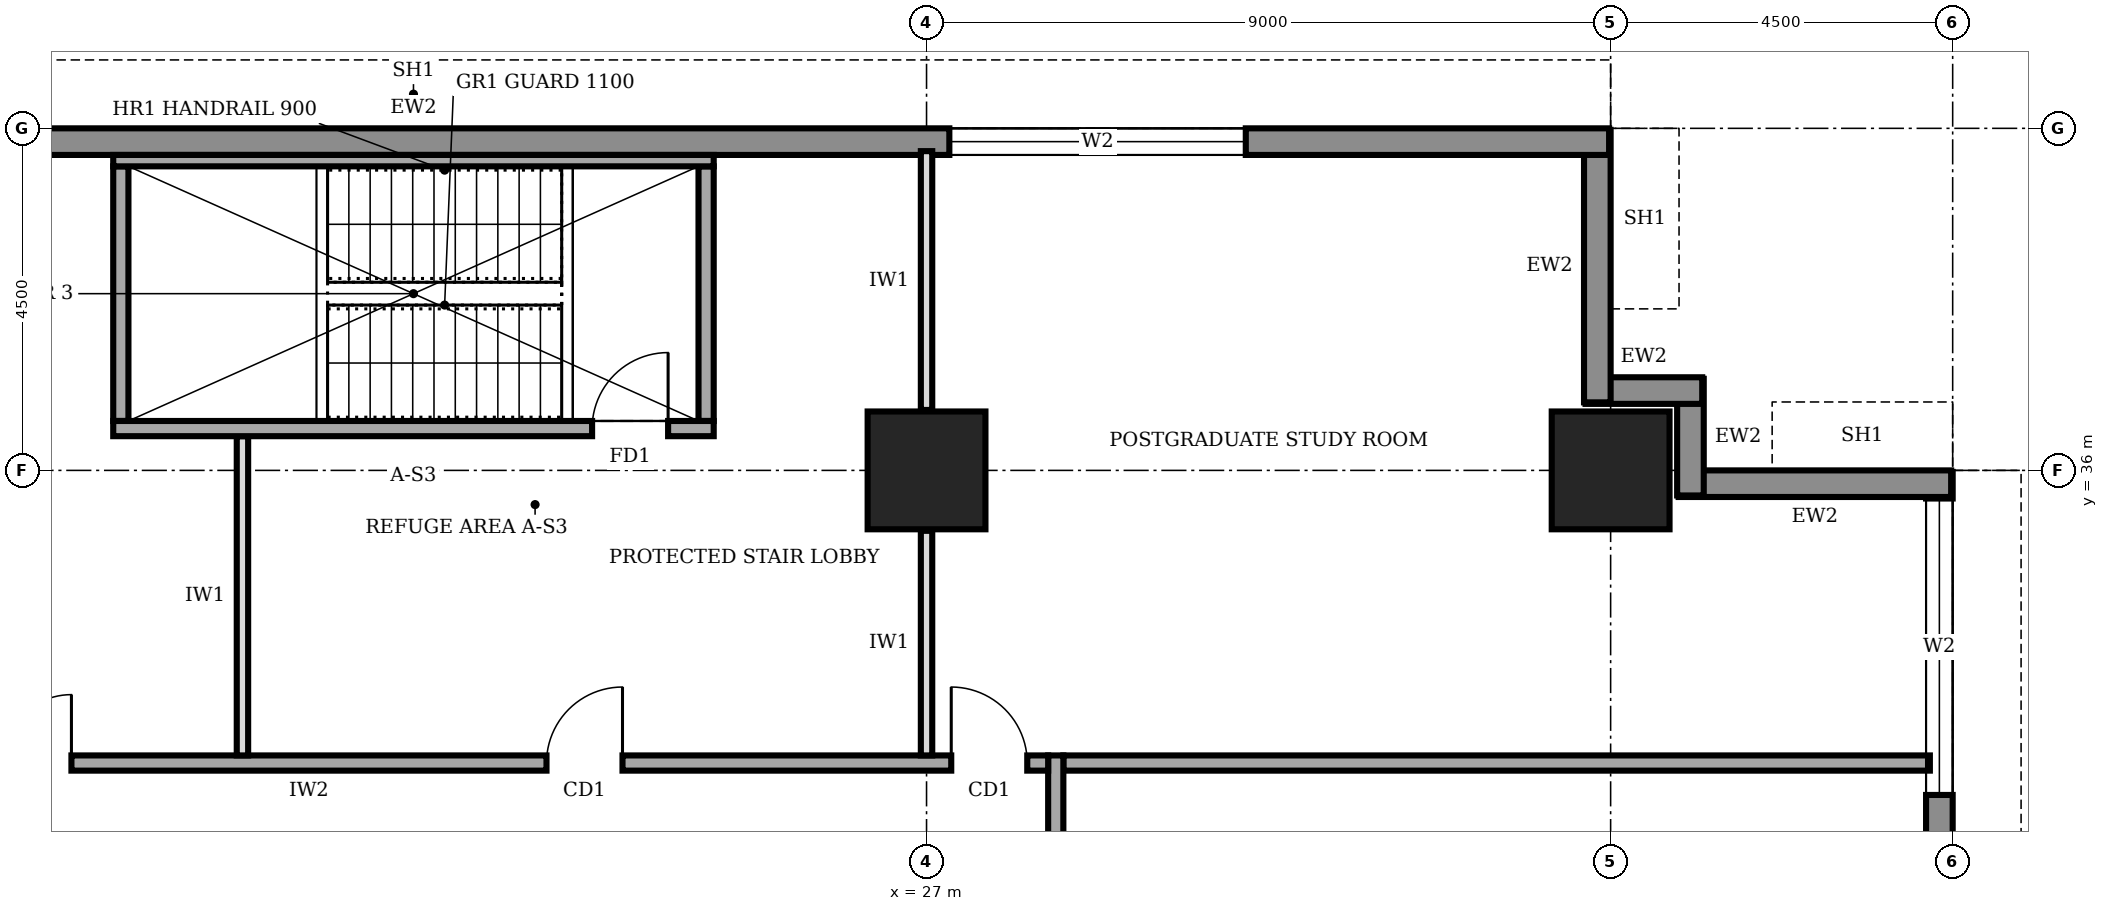
"""IFC4 building model, lengths in metres.
Left out: names, types, materials, properties, quantities, classifications, styles, units other than length and angle.
Written with IfcOpenShell. Run it as: python <this file> out.ifc"""

import sys

from ifc_helpers import new_model, si_unit, direction, frame, frame_2d, origin, origin_2d, place, context, subcontext, project, spatial, rectangle, extrude, element, fill, save


model = new_model("IFC4")
c1 = context("Model", 3, precision=1e-05, world=origin(), true_north=direction((0.0, 1.0)))
c2 = subcontext(c1, "Body", "Model", "MODEL_VIEW")
j1 = project(units=[si_unit("LENGTHUNIT", "METRE"), si_unit("PLANEANGLEUNIT", "RADIAN")], contexts=[c1])
p1 = place(None, origin())
s1 = spatial("IfcSite", under=j1, at=p1, CompositionType="ELEMENT")
p2 = place(p1, origin())
s2 = spatial("IfcBuilding", under=s1, at=p2, CompositionType="ELEMENT")
p3 = place(p2, frame((0.0, 0.0, 229.0)))
s3 = spatial("IfcBuildingStorey", under=s2, at=p3, CompositionType="ELEMENT", Elevation=229.0)
for number, where, z_axis, x_axis in (
    (1, (27.0, 36.0, 0.0), (0.0, 0.0, 1.0), (1.0, 0.0, 0.0)),
    (2, (36.0, 36.0, 0.0), (0.0, 0.0, 1.0), (1.0, 0.0, 0.0)),
):
    element("IfcColumn", number, at=place(p3, frame(where, z_axis=z_axis, x_axis=x_axis)), inside=s3, PredefinedType="COLUMN", context=c2, shape_type="SweptSolid", body=[
        extrude(rectangle(XDim=1.55, YDim=1.55, at=origin_2d()), origin(), (0.0, 0.0, 1.0), 4.0),
    ])
p4 = place(p3, frame((40.325, 4.52, 0.0), z_axis=(0.0, 0.0, 1.0), x_axis=(0.0, 1.0, 0.0)))
e3 = element("IfcWall", 3, at=p4, inside=s3, PredefinedType="STANDARD", context=c2, shape_type="SweptSolid", body=[
    extrude(rectangle(XDim=31.46, YDim=0.35, at=frame_2d((15.73, 0.0))), origin(), (0.0, 0.0, 1.0), 3.75),
])
p5 = place(p4, frame((4.78, 0.0, 0.6)))
e4 = element("IfcOpeningElement", 4, at=p5, cuts=e3, PredefinedType="OPENING", context=c2, shape_type="SweptSolid", body=[
    extrude(rectangle(XDim=3.9, YDim=2.6, at=frame_2d((1.95, 1.3))), frame((0.0, 0.185, 0.0), z_axis=(0.0, -1.0, 0.0), x_axis=(1.0, 0.0, 0.0)), (0.0, 0.0, 1.0), 0.37),
])
p6 = place(p4, frame((9.28, 0.0, 0.6)))
e5 = element("IfcOpeningElement", 5, at=p6, cuts=e3, PredefinedType="OPENING", context=c2, shape_type="SweptSolid", body=[
    extrude(rectangle(XDim=3.9, YDim=2.6, at=frame_2d((1.95, 1.3))), frame((0.0, 0.185, 0.0), z_axis=(0.0, -1.0, 0.0), x_axis=(1.0, 0.0, 0.0)), (0.0, 0.0, 1.0), 0.37),
])
p7 = place(p4, frame((13.78, 0.0, 0.6)))
e6 = element("IfcOpeningElement", 6, at=p7, cuts=e3, PredefinedType="OPENING", context=c2, shape_type="SweptSolid", body=[
    extrude(rectangle(XDim=3.9, YDim=2.6, at=frame_2d((1.95, 1.3))), frame((0.0, 0.185, 0.0), z_axis=(0.0, -1.0, 0.0), x_axis=(1.0, 0.0, 0.0)), (0.0, 0.0, 1.0), 0.37),
])
p8 = place(p4, frame((18.28, 0.0, 0.6)))
e7 = element("IfcOpeningElement", 7, at=p8, cuts=e3, PredefinedType="OPENING", context=c2, shape_type="SweptSolid", body=[
    extrude(rectangle(XDim=3.9, YDim=2.6, at=frame_2d((1.95, 1.3))), frame((0.0, 0.185, 0.0), z_axis=(0.0, -1.0, 0.0), x_axis=(1.0, 0.0, 0.0)), (0.0, 0.0, 1.0), 0.37),
])
p9 = place(p4, frame((22.78, 0.0, 0.6)))
e8 = element("IfcOpeningElement", 8, at=p9, cuts=e3, PredefinedType="OPENING", context=c2, shape_type="SweptSolid", body=[
    extrude(rectangle(XDim=3.9, YDim=2.6, at=frame_2d((1.95, 1.3))), frame((0.0, 0.185, 0.0), z_axis=(0.0, -1.0, 0.0), x_axis=(1.0, 0.0, 0.0)), (0.0, 0.0, 1.0), 0.37),
])
p10 = place(p4, frame((27.21, 0.0, 0.6)))
e9 = element("IfcOpeningElement", 9, at=p10, cuts=e3, PredefinedType="OPENING", context=c2, shape_type="SweptSolid", body=[
    extrude(rectangle(XDim=3.9, YDim=2.6, at=frame_2d((1.95, 1.3))), frame((0.0, 0.185, 0.0), z_axis=(0.0, -1.0, 0.0), x_axis=(1.0, 0.0, 0.0)), (0.0, 0.0, 1.0), 0.37),
])
p11 = place(p3, frame((40.48, 35.825, 0.0), z_axis=(0.0, 0.0, 1.0), x_axis=(-1.0, 0.0, 0.0)))
e10 = element("IfcWall", 10, at=p11, inside=s3, PredefinedType="STANDARD", context=c2, shape_type="SweptSolid", body=[
    extrude(rectangle(XDim=3.585, YDim=0.35, at=frame_2d((1.792, 0.0))), origin(), (0.0, 0.0, 1.0), 2.85),
])
for number, where, z_axis, x_axis in (
    (11, (37.05, 35.67, 0.0), (0.0, 0.0, 1.0), (0.0, 1.0, 0.0)),
    (12, (37.205, 37.05, 0.0), (0.0, 0.0, 1.0), (-1.0, 0.0, 0.0)),
):
    element("IfcWall", number, at=place(p3, frame(where, z_axis=z_axis, x_axis=x_axis)), inside=s3, PredefinedType="STANDARD", context=c2, shape_type="SweptSolid", body=[
        extrude(rectangle(XDim=1.535, YDim=0.35, at=frame_2d((0.768, 0.0))), origin(), (0.0, 0.0, 1.0), 3.75),
    ])
p12 = place(p3, frame((35.825, 36.895, 0.0), z_axis=(0.0, 0.0, 1.0), x_axis=(0.0, 1.0, 0.0)))
e13 = element("IfcWall", 13, at=p12, inside=s3, PredefinedType="STANDARD", context=c2, shape_type="SweptSolid", body=[
    extrude(rectangle(XDim=3.585, YDim=0.35, at=frame_2d((1.792, 0.0))), origin(), (0.0, 0.0, 1.0), 2.85),
])
p13 = place(p3, frame((35.98, 40.325, 0.0), z_axis=(0.0, 0.0, 1.0), x_axis=(-1.0, 0.0, 0.0)))
e14 = element("IfcWall", 14, at=p13, inside=s3, PredefinedType="STANDARD", context=c2, shape_type="SweptSolid", body=[
    extrude(rectangle(XDim=31.46, YDim=0.35, at=frame_2d((15.73, 0.0))), origin(), (0.0, 0.0, 1.0), 3.75),
])
p14 = place(p13, frame((27.21, 0.0, 0.6)))
e15 = element("IfcOpeningElement", 15, at=p14, cuts=e14, PredefinedType="OPENING", context=c2, shape_type="SweptSolid", body=[
    extrude(rectangle(XDim=3.9, YDim=2.6, at=frame_2d((1.95, 1.3))), frame((0.0, 0.185, 0.0), z_axis=(0.0, -1.0, 0.0), x_axis=(1.0, 0.0, 0.0)), (0.0, 0.0, 1.0), 0.37),
])
p15 = place(p13, frame((22.78, 0.0, 0.6)))
e16 = element("IfcOpeningElement", 16, at=p15, cuts=e14, PredefinedType="OPENING", context=c2, shape_type="SweptSolid", body=[
    extrude(rectangle(XDim=3.9, YDim=2.6, at=frame_2d((1.95, 1.3))), frame((0.0, 0.185, 0.0), z_axis=(0.0, -1.0, 0.0), x_axis=(1.0, 0.0, 0.0)), (0.0, 0.0, 1.0), 0.37),
])
p16 = place(p13, frame((4.78, 0.0, 0.6)))
e17 = element("IfcOpeningElement", 17, at=p16, cuts=e14, PredefinedType="OPENING", context=c2, shape_type="SweptSolid", body=[
    extrude(rectangle(XDim=3.9, YDim=2.6, at=frame_2d((1.95, 1.3))), frame((0.0, 0.185, 0.0), z_axis=(0.0, -1.0, 0.0), x_axis=(1.0, 0.0, 0.0)), (0.0, 0.0, 1.0), 0.37),
])
p17 = place(p3, frame((28.7, 9.2, 0.0), z_axis=(0.0, 0.0, 1.0), x_axis=(0.0, 1.0, 0.0)))
e18 = element("IfcWall", 18, at=p17, inside=s3, PredefinedType="SOLIDWALL", context=c2, shape_type="SweptSolid", body=[
    extrude(rectangle(XDim=23.05, YDim=0.2, at=frame_2d((11.525, 0.0))), origin(), (0.0, 0.0, 1.0), 3.75),
])
p18 = place(p17, frame((3.4, 0.0, 0.0)))
e19 = element("IfcOpeningElement", 19, at=p18, cuts=e18, PredefinedType="OPENING", context=c2, shape_type="SweptSolid", body=[
    extrude(rectangle(XDim=1.8, YDim=2.1, at=frame_2d((0.9, 1.05))), frame((0.0, 0.11, 0.0), z_axis=(0.0, -1.0, 0.0), x_axis=(1.0, 0.0, 0.0)), (0.0, 0.0, 1.0), 0.22),
])
p19 = place(p17, frame((12.4, 0.0, 0.0)))
e20 = element("IfcOpeningElement", 20, at=p19, cuts=e18, PredefinedType="OPENING", context=c2, shape_type="SweptSolid", body=[
    extrude(rectangle(XDim=1.8, YDim=2.1, at=frame_2d((0.9, 1.05))), frame((0.0, 0.11, 0.0), z_axis=(0.0, -1.0, 0.0), x_axis=(1.0, 0.0, 0.0)), (0.0, 0.0, 1.0), 0.22),
])
p20 = place(p17, frame((19.925, 0.0, 0.0)))
e21 = element("IfcOpeningElement", 21, at=p20, cuts=e18, PredefinedType="OPENING", context=c2, shape_type="SweptSolid", body=[
    extrude(rectangle(XDim=1.0, YDim=2.1, at=frame_2d((0.5, 1.05))), frame((0.0, 0.11, 0.0), z_axis=(0.0, -1.0, 0.0), x_axis=(1.0, 0.0, 0.0)), (0.0, 0.0, 1.0), 0.22),
])
p21 = place(p3, frame((28.6, 32.15, 0.0), z_axis=(0.0, 0.0, 1.0), x_axis=(-1.0, 0.0, 0.0)))
e22 = element("IfcWall", 22, at=p21, inside=s3, PredefinedType="SOLIDWALL", context=c2, shape_type="SweptSolid", body=[
    extrude(rectangle(XDim=16.9, YDim=0.2, at=frame_2d((8.45, 0.0))), origin(), (0.0, 0.0, 1.0), 3.75),
])
p22 = place(p21, frame((12.85, 0.0, 0.0)))
e23 = element("IfcOpeningElement", 23, at=p22, cuts=e22, PredefinedType="OPENING", context=c2, shape_type="SweptSolid", body=[
    extrude(rectangle(XDim=1.8, YDim=2.1, at=frame_2d((0.9, 1.05))), frame((0.0, 0.11, 0.0), z_axis=(0.0, -1.0, 0.0), x_axis=(1.0, 0.0, 0.0)), (0.0, 0.0, 1.0), 0.22),
])
p23 = place(p21, frame((5.6, 0.0, 0.0)))
e24 = element("IfcOpeningElement", 24, at=p23, cuts=e22, PredefinedType="OPENING", context=c2, shape_type="SweptSolid", body=[
    extrude(rectangle(XDim=1.0, YDim=2.1, at=frame_2d((0.5, 1.05))), frame((0.0, 0.11, 0.0), z_axis=(0.0, -1.0, 0.0), x_axis=(1.0, 0.0, 0.0)), (0.0, 0.0, 1.0), 0.22),
])
p24 = place(p21, frame((0.275, 0.0, 0.0)))
e25 = element("IfcOpeningElement", 25, at=p24, cuts=e22, PredefinedType="OPENING", context=c2, shape_type="SweptSolid", body=[
    extrude(rectangle(XDim=1.0, YDim=2.1, at=frame_2d((0.5, 1.05))), frame((0.0, 0.11, 0.0), z_axis=(0.0, -1.0, 0.0), x_axis=(1.0, 0.0, 0.0)), (0.0, 0.0, 1.0), 0.22),
])
p25 = place(p3, frame((28.8, 32.15, 0.0), z_axis=(0.0, 0.0, 1.0), x_axis=(1.0, 0.0, 0.0)))
e26 = element("IfcWall", 26, at=p25, inside=s3, PredefinedType="SOLIDWALL", context=c2, shape_type="SweptSolid", body=[
    extrude(rectangle(XDim=11.4, YDim=0.2, at=frame_2d((5.7, 0.0))), origin(), (0.0, 0.0, 1.0), 3.75),
])
p26 = place(p3, frame((18.0, 32.25, 0.0), z_axis=(0.0, 0.0, 1.0), x_axis=(0.0, 1.0, 0.0)))
e27 = element("IfcWall", 27, at=p26, inside=s3, PredefinedType="PARTITIONING", context=c2, shape_type="SweptSolid", body=[
    extrude(rectangle(XDim=4.2, YDim=0.15, at=frame_2d((2.1, 0.0))), origin(), (0.0, 0.0, 1.0), 3.75),
])
p27 = place(p3, frame((27.0, 32.25, 0.0), z_axis=(0.0, 0.0, 1.0), x_axis=(0.0, 1.0, 0.0)))
e28 = element("IfcWall", 28, at=p27, inside=s3, PredefinedType="PARTITIONING", context=c2, shape_type="SweptSolid", body=[
    extrude(rectangle(XDim=2.955, YDim=0.15, at=frame_2d((1.478, 0.0))), origin(), (0.0, 0.0, 1.0), 2.85),
])
p28 = place(p3, frame((27.0, 36.795, 0.0), z_axis=(0.0, 0.0, 1.0), x_axis=(0.0, 1.0, 0.0)))
e29 = element("IfcWall", 29, at=p28, inside=s3, PredefinedType="PARTITIONING", context=c2, shape_type="SweptSolid", body=[
    extrude(rectangle(XDim=3.405, YDim=0.15, at=frame_2d((1.703, 0.0))), origin(), (0.0, 0.0, 1.0), 2.85),
])
p29 = place(p3, frame((16.3, 36.55, 0.0), z_axis=(0.0, 0.0, 1.0), x_axis=(1.0, 0.0, 0.0)))
e30 = element("IfcWall", 30, at=p29, inside=s3, PredefinedType="SOLIDWALL", context=c2, shape_type="SweptSolid", body=[
    extrude(rectangle(XDim=7.9, YDim=0.2, at=frame_2d((3.95, 0.0))), origin(), (0.0, 0.0, 1.0), 3.75),
])
p30 = place(p29, frame((6.3, 0.0, 0.0)))
e31 = element("IfcOpeningElement", 31, at=p30, cuts=e30, PredefinedType="OPENING", context=c2, shape_type="SweptSolid", body=[
    extrude(rectangle(XDim=1.0, YDim=2.1, at=frame_2d((0.5, 1.05))), frame((0.0, 0.11, 0.0), z_axis=(0.0, -1.0, 0.0), x_axis=(1.0, 0.0, 0.0)), (0.0, 0.0, 1.0), 0.22),
])
p31 = place(p3, frame((16.3, 40.075, 0.0), z_axis=(0.0, 0.0, 1.0), x_axis=(1.0, 0.0, 0.0)))
e32 = element("IfcWall", 32, at=p31, inside=s3, PredefinedType="SOLIDWALL", context=c2, shape_type="SweptSolid", body=[
    extrude(rectangle(XDim=7.9, YDim=0.15, at=frame_2d((3.95, 0.0))), origin(), (0.0, 0.0, 1.0), 3.75),
])
for number, where, z_axis, x_axis in (
    (33, (16.4, 36.65, 0.0), (0.0, 0.0, 1.0), (0.0, 1.0, 0.0)),
    (34, (24.1, 36.65, 0.0), (0.0, 0.0, 1.0), (0.0, 1.0, 0.0)),
):
    element("IfcWall", number, at=place(p3, frame(where, z_axis=z_axis, x_axis=x_axis)), inside=s3, PredefinedType="SOLIDWALL", context=c2, shape_type="SweptSolid", body=[
        extrude(rectangle(XDim=3.35, YDim=0.2, at=frame_2d((1.675, 0.0))), origin(), (0.0, 0.0, 1.0), 3.75),
    ])
p32 = place(p10, origin())
e35 = element("IfcWindow", 35, at=p32, inside=s3, PartitioningType="SINGLE_PANEL", PredefinedType="WINDOW", context=c2, shape_type="SweptSolid", body=[
    extrude(rectangle(XDim=3.9, YDim=2.6, at=frame_2d((1.95, 1.3))), frame((0.0, 0.03, 0.0), z_axis=(0.0, -1.0, 0.0), x_axis=(1.0, 0.0, 0.0)), (0.0, 0.0, 1.0), 0.06),
])
fill(e9, e35)
p33 = place(p16, origin())
e36 = element("IfcWindow", 36, at=p33, inside=s3, PartitioningType="SINGLE_PANEL", PredefinedType="WINDOW", context=c2, shape_type="SweptSolid", body=[
    extrude(rectangle(XDim=3.9, YDim=2.6, at=frame_2d((1.95, 1.3))), frame((0.0, 0.03, 0.0), z_axis=(0.0, -1.0, 0.0), x_axis=(1.0, 0.0, 0.0)), (0.0, 0.0, 1.0), 0.06),
])
fill(e17, e36)
p34 = place(p22, frame((1.8, 0.0, 0.0), z_axis=(0.0, 0.0, 1.0), x_axis=(-1.0, 0.0, 0.0)))
e37 = element("IfcDoor", 37, at=p34, inside=s3, OperationType="DOUBLE_DOOR_SINGLE_SWING", PredefinedType="DOOR", context=c2, shape_type="SweptSolid", body=[
    extrude(rectangle(XDim=1.8, YDim=2.1, at=frame_2d((0.9, 1.05))), frame((0.0, 0.025, 0.0), z_axis=(0.0, -1.0, 0.0), x_axis=(1.0, 0.0, 0.0)), (0.0, 0.0, 1.0), 0.05),
])
fill(e23, e37)
p35 = place(p23, frame((1.0, 0.0, 0.0), z_axis=(0.0, 0.0, 1.0), x_axis=(-1.0, 0.0, 0.0)))
e38 = element("IfcDoor", 38, at=p35, inside=s3, OperationType="SINGLE_SWING_RIGHT", PredefinedType="DOOR", context=c2, shape_type="SweptSolid", body=[
    extrude(rectangle(XDim=1.0, YDim=2.1, at=frame_2d((0.5, 1.05))), frame((0.0, 0.025, 0.0), z_axis=(0.0, -1.0, 0.0), x_axis=(1.0, 0.0, 0.0)), (0.0, 0.0, 1.0), 0.05),
])
fill(e24, e38)
p36 = place(p24, frame((1.0, 0.0, 0.0), z_axis=(0.0, 0.0, 1.0), x_axis=(-1.0, 0.0, 0.0)))
e39 = element("IfcDoor", 39, at=p36, inside=s3, OperationType="SINGLE_SWING_LEFT", PredefinedType="DOOR", context=c2, shape_type="SweptSolid", body=[
    extrude(rectangle(XDim=1.0, YDim=2.1, at=frame_2d((0.5, 1.05))), frame((0.0, 0.025, 0.0), z_axis=(0.0, -1.0, 0.0), x_axis=(1.0, 0.0, 0.0)), (0.0, 0.0, 1.0), 0.05),
])
fill(e25, e39)
p37 = place(p30, origin())
e40 = element("IfcDoor", 40, at=p37, inside=s3, OperationType="SINGLE_SWING_RIGHT", PredefinedType="DOOR", context=c2, shape_type="SweptSolid", body=[
    extrude(rectangle(XDim=1.0, YDim=2.1, at=frame_2d((0.5, 1.05))), frame((0.0, 0.025, 0.0), z_axis=(0.0, -1.0, 0.0), x_axis=(1.0, 0.0, 0.0)), (0.0, 0.0, 1.0), 0.05),
])
fill(e31, e40)
save(model, sys.argv[1])
